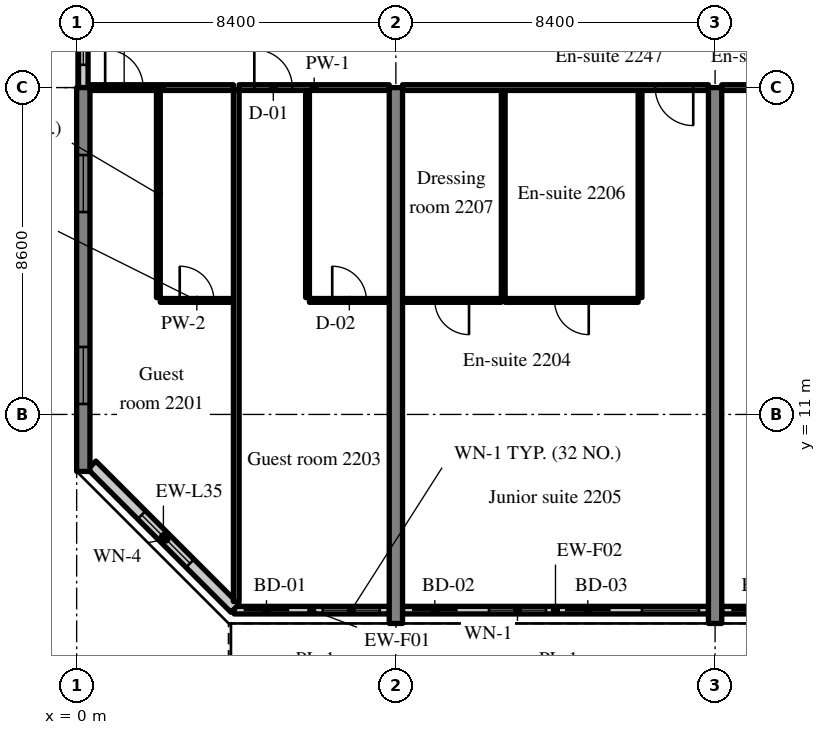
"""IFC4 building model, lengths in metres.
Left out: names, types, materials, properties, quantities, classifications, styles, units other than length and angle.
Written with IfcOpenShell. Run it as: python <this file> out.ifc"""

import sys

from ifc_helpers import new_model, si_unit, direction, frame, frame_2d, origin, place, context, subcontext, project, spatial, rectangle, extrude, source, transform, mapped, element, fill, save


model = new_model("IFC4")
c1 = context("Model", 3, precision=1e-05, world=origin(), true_north=direction((0.0, 1.0)))
c2 = subcontext(c1, "Body", "Model", "MODEL_VIEW")
j1 = project(units=[si_unit("LENGTHUNIT", "METRE"), si_unit("PLANEANGLEUNIT", "RADIAN")], contexts=[c1])
p1 = place(None, origin())
s1 = spatial("IfcSite", under=j1, at=p1, CompositionType="ELEMENT")
p2 = place(p1, origin())
s2 = spatial("IfcBuilding", under=s1, at=p2, CompositionType="ELEMENT")
p3 = place(p2, frame((0.0, 0.0, 95.2)))
s3 = spatial("IfcBuildingStorey", under=s2, at=p3, CompositionType="ELEMENT", Elevation=95.2)
m1 = source(origin(), c2, "Body", "SweptSolid", [
    extrude(rectangle(XDim=10.1, YDim=0.35, at=frame_2d((5.05, 0.0))), origin(), (0.0, 0.0, 1.0), 3.52),
])
p4 = place(p3, frame((0.175, 9.5, 0.0), z_axis=(0.0, 0.0, 1.0), x_axis=(0.0, 1.0, 0.0)))
e1 = element("IfcWall", 1, at=p4, inside=s3, PredefinedType="SHEAR", context=c2, shape_type="MappedRepresentation", body=[
    mapped(m1, transform((0.0, 0.0, 0.0), scale=1.0)),
])
m2 = source(origin(), c2, "Body", "SweptSolid", [
    extrude(rectangle(XDim=1.5, YDim=1.5, at=frame_2d((0.75, 0.75))), frame((0.0, 0.185, 0.0), z_axis=(0.0, -1.0, 0.0), x_axis=(1.0, 0.0, 0.0)), (0.0, 0.0, 1.0), 0.37),
])
p5 = place(p4, frame((1.775, 0.0, 0.9)))
e2 = element("IfcOpeningElement", 2, at=p5, cuts=e1, PredefinedType="OPENING", context=c2, shape_type="MappedRepresentation", body=[
    mapped(m2, transform((0.0, 0.0, 0.0), scale=1.0)),
])
p6 = place(p4, frame((6.825, 0.0, 0.9)))
e3 = element("IfcOpeningElement", 3, at=p6, cuts=e1, PredefinedType="OPENING", context=c2, shape_type="MappedRepresentation", body=[
    mapped(m2, transform((0.0, 0.0, 0.0), scale=1.0)),
])
m3 = source(origin(), c2, "Body", "SweptSolid", [
    extrude(rectangle(XDim=14.1, YDim=0.35, at=frame_2d((7.05, 0.0))), origin(), (0.0, 0.0, 1.0), 3.52),
])
for number, where, z_axis, x_axis in (
    (4, (8.4, 5.5, 0.0), (0.0, 0.0, 1.0), (0.0, 1.0, 0.0)),
    (5, (16.8, 5.5, 0.0), (0.0, 0.0, 1.0), (0.0, 1.0, 0.0)),
):
    element("IfcWall", number, at=place(p3, frame(where, z_axis=z_axis, x_axis=x_axis)), inside=s3, PredefinedType="SHEAR", context=c2, shape_type="MappedRepresentation", body=[
        mapped(m3, transform((0.0, 0.0, 0.0), scale=1.0)),
    ])
m4 = source(origin(), c2, "Body", "SweptSolid", [
    extrude(rectangle(XDim=4.08, YDim=0.2, at=frame_2d((2.04, 0.0))), origin(), (0.0, 0.0, 1.0), 2.82),
])
p7 = place(p3, frame((4.145, 5.85, 0.0), z_axis=(0.0, 0.0, 1.0), x_axis=(1.0, 0.0, 0.0)))
e6 = element("IfcWall", 6, at=p7, inside=s3, PredefinedType="SOLIDWALL", context=c2, shape_type="MappedRepresentation", body=[
    mapped(m4, transform((0.0, 0.0, 0.0), scale=1.0)),
])
m5 = source(origin(), c2, "Body", "SweptSolid", [
    extrude(rectangle(XDim=1.2, YDim=2.4, at=frame_2d((0.6, 1.2))), frame((0.0, 0.11, 0.0), z_axis=(0.0, -1.0, 0.0), x_axis=(1.0, 0.0, 0.0)), (0.0, 0.0, 1.0), 0.22),
])
p8 = place(p7, frame((0.25, 0.0, 0.0)))
e7 = element("IfcOpeningElement", 7, at=p8, cuts=e6, PredefinedType="OPENING", context=c2, shape_type="MappedRepresentation", body=[
    mapped(m5, transform((0.0, 0.0, 0.0), scale=1.0)),
])
m6 = source(origin(), c2, "Body", "SweptSolid", [
    extrude(rectangle(XDim=1.5, YDim=1.5, at=frame_2d((0.75, 0.75))), frame((0.0, 0.11, 0.0), z_axis=(0.0, -1.0, 0.0), x_axis=(1.0, 0.0, 0.0)), (0.0, 0.0, 1.0), 0.22),
])
p9 = place(p7, frame((2.33, 0.0, 0.9)))
e8 = element("IfcOpeningElement", 8, at=p9, cuts=e6, PredefinedType="OPENING", context=c2, shape_type="MappedRepresentation", body=[
    mapped(m6, transform((0.0, 0.0, 0.0), scale=1.0)),
])
m7 = source(origin(), c2, "Body", "SweptSolid", [
    extrude(rectangle(XDim=8.05, YDim=0.2, at=frame_2d((4.025, 0.0))), origin(), (0.0, 0.0, 1.0), 2.82),
])
p10 = place(p3, frame((8.575, 5.85, 0.0), z_axis=(0.0, 0.0, 1.0), x_axis=(1.0, 0.0, 0.0)))
e9 = element("IfcWall", 9, at=p10, inside=s3, PredefinedType="SOLIDWALL", context=c2, shape_type="MappedRepresentation", body=[
    mapped(m7, transform((0.0, 0.0, 0.0), scale=1.0)),
])
p11 = place(p10, frame((0.25, 0.0, 0.0)))
e10 = element("IfcOpeningElement", 10, at=p11, cuts=e9, PredefinedType="OPENING", context=c2, shape_type="MappedRepresentation", body=[
    mapped(m5, transform((0.0, 0.0, 0.0), scale=1.0)),
])
p12 = place(p10, frame((2.275, 0.0, 0.9)))
e11 = element("IfcOpeningElement", 11, at=p12, cuts=e9, PredefinedType="OPENING", context=c2, shape_type="MappedRepresentation", body=[
    mapped(m6, transform((0.0, 0.0, 0.0), scale=1.0)),
])
p13 = place(p10, frame((4.275, 0.0, 0.0)))
e12 = element("IfcOpeningElement", 12, at=p13, cuts=e9, PredefinedType="OPENING", context=c2, shape_type="MappedRepresentation", body=[
    mapped(m5, transform((0.0, 0.0, 0.0), scale=1.0)),
])
p14 = place(p10, frame((6.3, 0.0, 0.9)))
e13 = element("IfcOpeningElement", 13, at=p14, cuts=e9, PredefinedType="OPENING", context=c2, shape_type="MappedRepresentation", body=[
    mapped(m6, transform((0.0, 0.0, 0.0), scale=1.0)),
])
m8 = source(origin(), c2, "Body", "SweptSolid", [
    extrude(rectangle(XDim=8.05, YDim=0.2, at=frame_2d((4.025, 0.0))), origin(), (0.0, 0.0, 1.0), 2.82),
])
p15 = place(p3, frame((16.975, 5.85, 0.0), z_axis=(0.0, 0.0, 1.0), x_axis=(1.0, 0.0, 0.0)))
e14 = element("IfcWall", 14, at=p15, inside=s3, PredefinedType="SOLIDWALL", context=c2, shape_type="MappedRepresentation", body=[
    mapped(m8, transform((0.0, 0.0, 0.0), scale=1.0)),
])
p16 = place(p15, frame((0.25, 0.0, 0.0)))
e15 = element("IfcOpeningElement", 15, at=p16, cuts=e14, PredefinedType="OPENING", context=c2, shape_type="MappedRepresentation", body=[
    mapped(m5, transform((0.0, 0.0, 0.0), scale=1.0)),
])
p17 = place(p15, frame((2.275, 0.0, 0.9)))
e16 = element("IfcOpeningElement", 16, at=p17, cuts=e14, PredefinedType="OPENING", context=c2, shape_type="MappedRepresentation", body=[
    mapped(m6, transform((0.0, 0.0, 0.0), scale=1.0)),
])
p18 = place(p15, frame((4.275, 0.0, 0.0)))
e17 = element("IfcOpeningElement", 17, at=p18, cuts=e14, PredefinedType="OPENING", context=c2, shape_type="MappedRepresentation", body=[
    mapped(m5, transform((0.0, 0.0, 0.0), scale=1.0)),
])
p19 = place(p15, frame((6.3, 0.0, 0.9)))
e18 = element("IfcOpeningElement", 18, at=p19, cuts=e14, PredefinedType="OPENING", context=c2, shape_type="MappedRepresentation", body=[
    mapped(m6, transform((0.0, 0.0, 0.0), scale=1.0)),
])
m9 = source(origin(), c2, "Body", "SweptSolid", [
    extrude(rectangle(XDim=5.326, YDim=0.3, at=frame_2d((2.663, 0.0))), origin(), (0.0, 0.0, 1.0), 3.52),
])
p20 = place(p3, frame((0.4, 9.666, 0.0), z_axis=(0.0, 0.0, 1.0), x_axis=(0.707106781187, -0.707106781187, 0.0)))
e19 = element("IfcWall", 19, at=p20, inside=s3, PredefinedType="SOLIDWALL", context=c2, shape_type="MappedRepresentation", body=[
    mapped(m9, transform((0.0, 0.0, 0.0), scale=1.0)),
])
m10 = source(origin(), c2, "Body", "SweptSolid", [
    extrude(rectangle(XDim=1.8, YDim=1.5, at=frame_2d((0.9, 0.75))), frame((0.0, 0.16, 0.0), z_axis=(0.0, -1.0, 0.0), x_axis=(1.0, 0.0, 0.0)), (0.0, 0.0, 1.0), 0.32),
])
p21 = place(p20, frame((1.854, 0.0, 0.9)))
e20 = element("IfcOpeningElement", 20, at=p21, cuts=e19, PredefinedType="OPENING", context=c2, shape_type="MappedRepresentation", body=[
    mapped(m10, transform((0.0, 0.0, 0.0), scale=1.0)),
])
m11 = source(origin(), c2, "Body", "SweptSolid", [
    extrude(rectangle(XDim=2.4, YDim=0.25, at=frame_2d((1.2, 0.0))), origin(), (0.0, 0.0, 1.0), 2.62),
])
p22 = place(p3, frame((0.175, 19.6, 0.0), z_axis=(0.0, 0.0, 1.0), x_axis=(0.0, 1.0, 0.0)))
e21 = element("IfcWall", 21, at=p22, inside=s3, PredefinedType="SOLIDWALL", context=c2, shape_type="MappedRepresentation", body=[
    mapped(m11, transform((0.0, 0.0, 0.0), scale=1.0)),
])
m12 = source(origin(), c2, "Body", "SweptSolid", [
    extrude(rectangle(XDim=1.2, YDim=1.5, at=frame_2d((0.6, 0.75))), frame((0.0, 0.135, 0.0), z_axis=(0.0, -1.0, 0.0), x_axis=(1.0, 0.0, 0.0)), (0.0, 0.0, 1.0), 0.27),
])
p23 = place(p22, frame((0.6, 0.0, 0.9)))
e22 = element("IfcOpeningElement", 22, at=p23, cuts=e21, PredefinedType="OPENING", context=c2, shape_type="MappedRepresentation", body=[
    mapped(m12, transform((0.0, 0.0, 0.0), scale=1.0)),
])
m13 = source(origin(), c2, "Body", "SweptSolid", [
    extrude(rectangle(XDim=5.45, YDim=0.1, at=frame_2d((2.725, 0.0))), origin(), (0.0, 0.0, 1.0), 3.52),
])
p24 = place(p3, frame((2.15, 14.075, 0.0), z_axis=(0.0, 0.0, 1.0), x_axis=(0.0, 1.0, 0.0)))
e23 = element("IfcWall", 23, at=p24, inside=s3, PredefinedType="PARTITIONING", context=c2, shape_type="MappedRepresentation", body=[
    mapped(m13, transform((0.0, 0.0, 0.0), scale=1.0)),
])
m14 = source(origin(), c2, "Body", "SweptSolid", [
    extrude(rectangle(XDim=1.925, YDim=0.1, at=frame_2d((0.962, 0.0))), origin(), (0.0, 0.0, 1.0), 3.52),
])
p25 = place(p3, frame((2.2, 14.0, 0.0), z_axis=(0.0, 0.0, 1.0), x_axis=(1.0, 0.0, 0.0)))
e24 = element("IfcWall", 24, at=p25, inside=s3, PredefinedType="PARTITIONING", context=c2, shape_type="MappedRepresentation", body=[
    mapped(m14, transform((0.0, 0.0, 0.0), scale=1.0)),
])
m15 = source(origin(), c2, "Body", "SweptSolid", [
    extrude(rectangle(XDim=0.9, YDim=2.1, at=frame_2d((0.45, 1.05))), frame((0.0, 0.06, 0.0), z_axis=(0.0, -1.0, 0.0), x_axis=(1.0, 0.0, 0.0)), (0.0, 0.0, 1.0), 0.12),
])
p26 = place(p25, frame((0.512, 0.0, 0.0)))
e25 = element("IfcOpeningElement", 25, at=p26, cuts=e24, PredefinedType="OPENING", context=c2, shape_type="MappedRepresentation", body=[
    mapped(m15, transform((0.0, 0.0, 0.0), scale=1.0)),
])
m16 = source(origin(), c2, "Body", "SweptSolid", [
    extrude(rectangle(XDim=3.775, YDim=0.15, at=frame_2d((1.887, 0.0))), origin(), (0.0, 0.0, 1.0), 2.82),
])
p27 = place(p3, frame((0.35, 19.6, 0.0), z_axis=(0.0, 0.0, 1.0), x_axis=(1.0, 0.0, 0.0)))
e26 = element("IfcWall", 26, at=p27, inside=s3, PredefinedType="PARTITIONING", context=c2, shape_type="MappedRepresentation", body=[
    mapped(m16, transform((0.0, 0.0, 0.0), scale=1.0)),
])
m17 = source(origin(), c2, "Body", "SweptSolid", [
    extrude(rectangle(XDim=1.0, YDim=2.1, at=frame_2d((0.5, 1.05))), frame((0.0, 0.085, 0.0), z_axis=(0.0, -1.0, 0.0), x_axis=(1.0, 0.0, 0.0)), (0.0, 0.0, 1.0), 0.17),
])
p28 = place(p27, frame((0.4, 0.0, 0.0)))
e27 = element("IfcOpeningElement", 27, at=p28, cuts=e26, PredefinedType="OPENING", context=c2, shape_type="MappedRepresentation", body=[
    mapped(m17, transform((0.0, 0.0, 0.0), scale=1.0)),
])
p29 = place(p3, frame((6.075, 14.075, 0.0), z_axis=(0.0, 0.0, 1.0), x_axis=(0.0, 1.0, 0.0)))
e28 = element("IfcWall", 28, at=p29, inside=s3, PredefinedType="PARTITIONING", context=c2, shape_type="MappedRepresentation", body=[
    mapped(m13, transform((0.0, 0.0, 0.0), scale=1.0)),
])
m18 = source(origin(), c2, "Body", "SweptSolid", [
    extrude(rectangle(XDim=2.1, YDim=0.1, at=frame_2d((1.05, 0.0))), origin(), (0.0, 0.0, 1.0), 3.52),
])
p30 = place(p3, frame((6.125, 14.0, 0.0), z_axis=(0.0, 0.0, 1.0), x_axis=(1.0, 0.0, 0.0)))
e29 = element("IfcWall", 29, at=p30, inside=s3, PredefinedType="PARTITIONING", context=c2, shape_type="MappedRepresentation", body=[
    mapped(m18, transform((0.0, 0.0, 0.0), scale=1.0)),
])
p31 = place(p30, frame((0.6, 0.0, 0.0)))
e30 = element("IfcOpeningElement", 30, at=p31, cuts=e29, PredefinedType="OPENING", context=c2, shape_type="MappedRepresentation", body=[
    mapped(m15, transform((0.0, 0.0, 0.0), scale=1.0)),
])
m19 = source(origin(), c2, "Body", "SweptSolid", [
    extrude(rectangle(XDim=3.95, YDim=0.15, at=frame_2d((1.975, 0.0))), origin(), (0.0, 0.0, 1.0), 2.82),
])
p32 = place(p3, frame((4.275, 19.6, 0.0), z_axis=(0.0, 0.0, 1.0), x_axis=(1.0, 0.0, 0.0)))
e31 = element("IfcWall", 31, at=p32, inside=s3, PredefinedType="PARTITIONING", context=c2, shape_type="MappedRepresentation", body=[
    mapped(m19, transform((0.0, 0.0, 0.0), scale=1.0)),
])
p33 = place(p32, frame((0.4, 0.0, 0.0)))
e32 = element("IfcOpeningElement", 32, at=p33, cuts=e31, PredefinedType="OPENING", context=c2, shape_type="MappedRepresentation", body=[
    mapped(m17, transform((0.0, 0.0, 0.0), scale=1.0)),
])
m20 = source(origin(), c2, "Body", "SweptSolid", [
    extrude(rectangle(XDim=13.447, YDim=0.15, at=frame_2d((6.724, 0.0))), origin(), (0.0, 0.0, 1.0), 3.52),
])
p34 = place(p3, frame((4.2, 6.078, 0.0), z_axis=(0.0, 0.0, 1.0), x_axis=(0.0, 1.0, 0.0)))
e33 = element("IfcWall", 33, at=p34, inside=s3, PredefinedType="PARTITIONING", context=c2, shape_type="MappedRepresentation", body=[
    mapped(m20, transform((0.0, 0.0, 0.0), scale=1.0)),
])
for number, where, z_axis, x_axis in (
    (34, (14.825, 14.075, 0.0), (0.0, 0.0, 1.0), (0.0, 1.0, 0.0)),
    (35, (11.225, 14.075, 0.0), (0.0, 0.0, 1.0), (0.0, 1.0, 0.0)),
):
    element("IfcWall", number, at=place(p3, frame(where, z_axis=z_axis, x_axis=x_axis)), inside=s3, PredefinedType="PARTITIONING", context=c2, shape_type="MappedRepresentation", body=[
        mapped(m13, transform((0.0, 0.0, 0.0), scale=1.0)),
    ])
m21 = source(origin(), c2, "Body", "SweptSolid", [
    extrude(rectangle(XDim=3.5, YDim=0.1, at=frame_2d((1.75, 0.0))), origin(), (0.0, 0.0, 1.0), 3.52),
])
p35 = place(p3, frame((11.275, 14.0, 0.0), z_axis=(0.0, 0.0, 1.0), x_axis=(1.0, 0.0, 0.0)))
e36 = element("IfcWall", 36, at=p35, inside=s3, PredefinedType="PARTITIONING", context=c2, shape_type="MappedRepresentation", body=[
    mapped(m21, transform((0.0, 0.0, 0.0), scale=1.0)),
])
p36 = place(p35, frame((1.3, 0.0, 0.0)))
e37 = element("IfcOpeningElement", 37, at=p36, cuts=e36, PredefinedType="OPENING", context=c2, shape_type="MappedRepresentation", body=[
    mapped(m15, transform((0.0, 0.0, 0.0), scale=1.0)),
])
m22 = source(origin(), c2, "Body", "SweptSolid", [
    extrude(rectangle(XDim=2.6, YDim=0.1, at=frame_2d((1.3, 0.0))), origin(), (0.0, 0.0, 1.0), 3.52),
])
p37 = place(p3, frame((8.575, 14.0, 0.0), z_axis=(0.0, 0.0, 1.0), x_axis=(1.0, 0.0, 0.0)))
e38 = element("IfcWall", 38, at=p37, inside=s3, PredefinedType="PARTITIONING", context=c2, shape_type="MappedRepresentation", body=[
    mapped(m22, transform((0.0, 0.0, 0.0), scale=1.0)),
])
p38 = place(p37, frame((0.85, 0.0, 0.0)))
e39 = element("IfcOpeningElement", 39, at=p38, cuts=e38, PredefinedType="OPENING", context=c2, shape_type="MappedRepresentation", body=[
    mapped(m15, transform((0.0, 0.0, 0.0), scale=1.0)),
])
m23 = source(origin(), c2, "Body", "SweptSolid", [
    extrude(rectangle(XDim=8.05, YDim=0.15, at=frame_2d((4.025, 0.0))), origin(), (0.0, 0.0, 1.0), 2.82),
])
p39 = place(p3, frame((8.575, 19.6, 0.0), z_axis=(0.0, 0.0, 1.0), x_axis=(1.0, 0.0, 0.0)))
e40 = element("IfcWall", 40, at=p39, inside=s3, PredefinedType="PARTITIONING", context=c2, shape_type="MappedRepresentation", body=[
    mapped(m23, transform((0.0, 0.0, 0.0), scale=1.0)),
])
p40 = place(p39, frame((6.65, 0.0, 0.0)))
e41 = element("IfcOpeningElement", 41, at=p40, cuts=e40, PredefinedType="OPENING", context=c2, shape_type="MappedRepresentation", body=[
    mapped(m17, transform((0.0, 0.0, 0.0), scale=1.0)),
])
m24 = source(origin(), c2, "Body", "SweptSolid", [
    extrude(rectangle(XDim=8.05, YDim=0.15, at=frame_2d((4.025, 0.0))), origin(), (0.0, 0.0, 1.0), 2.82),
])
p41 = place(p3, frame((16.975, 19.6, 0.0), z_axis=(0.0, 0.0, 1.0), x_axis=(1.0, 0.0, 0.0)))
e42 = element("IfcWall", 42, at=p41, inside=s3, PredefinedType="PARTITIONING", context=c2, shape_type="MappedRepresentation", body=[
    mapped(m24, transform((0.0, 0.0, 0.0), scale=1.0)),
])
m25 = source(origin(), c2, "Body", "SweptSolid", [
    extrude(rectangle(XDim=1.8, YDim=2.1, at=frame_2d((0.9, 1.05))), frame((0.0, 0.085, 0.0), z_axis=(0.0, -1.0, 0.0), x_axis=(1.0, 0.0, 0.0)), (0.0, 0.0, 1.0), 0.17),
])
p42 = place(p41, frame((3.125, 0.0, 0.0)))
e43 = element("IfcOpeningElement", 43, at=p42, cuts=e42, PredefinedType="OPENING", context=c2, shape_type="MappedRepresentation", body=[
    mapped(m25, transform((0.0, 0.0, 0.0), scale=1.0)),
])
m26 = source(origin(), c2, "Body", "SweptSolid", [
    extrude(rectangle(XDim=1.2, YDim=2.4, at=frame_2d((0.6, 1.2))), frame((0.0, 0.025, 0.0), z_axis=(0.0, -1.0, 0.0), x_axis=(1.0, 0.0, 0.0)), (0.0, 0.0, 1.0), 0.05),
])
p43 = place(p8, origin())
e44 = element("IfcDoor", 44, at=p43, inside=s3, OperationType="SLIDING_TO_LEFT", PredefinedType="DOOR", context=c2, shape_type="MappedRepresentation", body=[
    mapped(m26, transform((0.0, 0.0, 0.0), scale=1.0)),
])
fill(e7, e44)
m27 = source(origin(), c2, "Body", "SweptSolid", [
    extrude(rectangle(XDim=1.5, YDim=1.5, at=frame_2d((0.75, 0.75))), frame((0.0, 0.03, 0.0), z_axis=(0.0, -1.0, 0.0), x_axis=(1.0, 0.0, 0.0)), (0.0, 0.0, 1.0), 0.06),
])
p44 = place(p9, origin())
e45 = element("IfcWindow", 45, at=p44, inside=s3, PartitioningType="SINGLE_PANEL", PredefinedType="WINDOW", context=c2, shape_type="MappedRepresentation", body=[
    mapped(m27, transform((0.0, 0.0, 0.0), scale=1.0)),
])
fill(e8, e45)
p45 = place(p11, origin())
e46 = element("IfcDoor", 46, at=p45, inside=s3, OperationType="SLIDING_TO_RIGHT", PredefinedType="DOOR", context=c2, shape_type="MappedRepresentation", body=[
    mapped(m26, transform((0.0, 0.0, 0.0), scale=1.0)),
])
fill(e10, e46)
p46 = place(p12, origin())
e47 = element("IfcWindow", 47, at=p46, inside=s3, PartitioningType="SINGLE_PANEL", PredefinedType="WINDOW", context=c2, shape_type="MappedRepresentation", body=[
    mapped(m27, transform((0.0, 0.0, 0.0), scale=1.0)),
])
fill(e11, e47)
p47 = place(p13, origin())
e48 = element("IfcDoor", 48, at=p47, inside=s3, OperationType="SLIDING_TO_LEFT", PredefinedType="DOOR", context=c2, shape_type="MappedRepresentation", body=[
    mapped(m26, transform((0.0, 0.0, 0.0), scale=1.0)),
])
fill(e12, e48)
p48 = place(p14, origin())
e49 = element("IfcWindow", 49, at=p48, inside=s3, PartitioningType="SINGLE_PANEL", PredefinedType="WINDOW", context=c2, shape_type="MappedRepresentation", body=[
    mapped(m27, transform((0.0, 0.0, 0.0), scale=1.0)),
])
fill(e13, e49)
p49 = place(p16, origin())
e50 = element("IfcDoor", 50, at=p49, inside=s3, OperationType="SLIDING_TO_RIGHT", PredefinedType="DOOR", context=c2, shape_type="MappedRepresentation", body=[
    mapped(m26, transform((0.0, 0.0, 0.0), scale=1.0)),
])
fill(e15, e50)
m28 = source(origin(), c2, "Body", "SweptSolid", [
    extrude(rectangle(XDim=1.8, YDim=1.5, at=frame_2d((0.9, 0.75))), frame((0.0, 0.03, 0.0), z_axis=(0.0, -1.0, 0.0), x_axis=(1.0, 0.0, 0.0)), (0.0, 0.0, 1.0), 0.06),
])
p50 = place(p21, origin())
e51 = element("IfcWindow", 51, at=p50, inside=s3, PartitioningType="SINGLE_PANEL", PredefinedType="WINDOW", context=c2, shape_type="MappedRepresentation", body=[
    mapped(m28, transform((0.0, 0.0, 0.0), scale=1.0)),
])
fill(e20, e51)
p51 = place(p5, origin())
e52 = element("IfcWindow", 52, at=p51, inside=s3, PartitioningType="SINGLE_PANEL", PredefinedType="WINDOW", context=c2, shape_type="MappedRepresentation", body=[
    mapped(m27, transform((0.0, 0.0, 0.0), scale=1.0)),
])
fill(e2, e52)
p52 = place(p6, origin())
e53 = element("IfcWindow", 53, at=p52, inside=s3, PartitioningType="SINGLE_PANEL", PredefinedType="WINDOW", context=c2, shape_type="MappedRepresentation", body=[
    mapped(m27, transform((0.0, 0.0, 0.0), scale=1.0)),
])
fill(e3, e53)
m29 = source(origin(), c2, "Body", "SweptSolid", [
    extrude(rectangle(XDim=1.2, YDim=1.5, at=frame_2d((0.6, 0.75))), frame((0.0, 0.03, 0.0), z_axis=(0.0, -1.0, 0.0), x_axis=(1.0, 0.0, 0.0)), (0.0, 0.0, 1.0), 0.06),
])
p53 = place(p23, origin())
e54 = element("IfcWindow", 54, at=p53, inside=s3, PartitioningType="SINGLE_PANEL", PredefinedType="WINDOW", context=c2, shape_type="MappedRepresentation", body=[
    mapped(m29, transform((0.0, 0.0, 0.0), scale=1.0)),
])
fill(e22, e54)
m30 = source(origin(), c2, "Body", "SweptSolid", [
    extrude(rectangle(XDim=0.9, YDim=2.1, at=frame_2d((0.45, 1.05))), frame((0.0, 0.025, 0.0), z_axis=(0.0, -1.0, 0.0), x_axis=(1.0, 0.0, 0.0)), (0.0, 0.0, 1.0), 0.05),
])
p54 = place(p26, origin())
e55 = element("IfcDoor", 55, at=p54, inside=s3, OperationType="SINGLE_SWING_LEFT", PredefinedType="DOOR", context=c2, shape_type="MappedRepresentation", body=[
    mapped(m30, transform((0.0, 0.0, 0.0), scale=1.0)),
])
fill(e25, e55)
m31 = source(origin(), c2, "Body", "SweptSolid", [
    extrude(rectangle(XDim=1.0, YDim=2.1, at=frame_2d((0.5, 1.05))), frame((0.0, 0.025, 0.0), z_axis=(0.0, -1.0, 0.0), x_axis=(1.0, 0.0, 0.0)), (0.0, 0.0, 1.0), 0.05),
])
p55 = place(p28, origin())
e56 = element("IfcDoor", 56, at=p55, inside=s3, OperationType="SINGLE_SWING_LEFT", PredefinedType="DOOR", context=c2, shape_type="MappedRepresentation", body=[
    mapped(m31, transform((0.0, 0.0, 0.0), scale=1.0)),
])
fill(e27, e56)
p56 = place(p31, origin())
e57 = element("IfcDoor", 57, at=p56, inside=s3, OperationType="SINGLE_SWING_LEFT", PredefinedType="DOOR", context=c2, shape_type="MappedRepresentation", body=[
    mapped(m30, transform((0.0, 0.0, 0.0), scale=1.0)),
])
fill(e30, e57)
p57 = place(p33, origin())
e58 = element("IfcDoor", 58, at=p57, inside=s3, OperationType="SINGLE_SWING_LEFT", PredefinedType="DOOR", context=c2, shape_type="MappedRepresentation", body=[
    mapped(m31, transform((0.0, 0.0, 0.0), scale=1.0)),
])
fill(e32, e58)
p58 = place(p36, origin())
e59 = element("IfcDoor", 59, at=p58, inside=s3, OperationType="SINGLE_SWING_RIGHT", PredefinedType="DOOR", context=c2, shape_type="MappedRepresentation", body=[
    mapped(m30, transform((0.0, 0.0, 0.0), scale=1.0)),
])
fill(e37, e59)
p59 = place(p38, origin())
e60 = element("IfcDoor", 60, at=p59, inside=s3, OperationType="SINGLE_SWING_RIGHT", PredefinedType="DOOR", context=c2, shape_type="MappedRepresentation", body=[
    mapped(m30, transform((0.0, 0.0, 0.0), scale=1.0)),
])
fill(e39, e60)
p60 = place(p40, origin())
e61 = element("IfcDoor", 61, at=p60, inside=s3, OperationType="SINGLE_SWING_RIGHT", PredefinedType="DOOR", context=c2, shape_type="MappedRepresentation", body=[
    mapped(m31, transform((0.0, 0.0, 0.0), scale=1.0)),
])
fill(e41, e61)
save(model, sys.argv[1])
